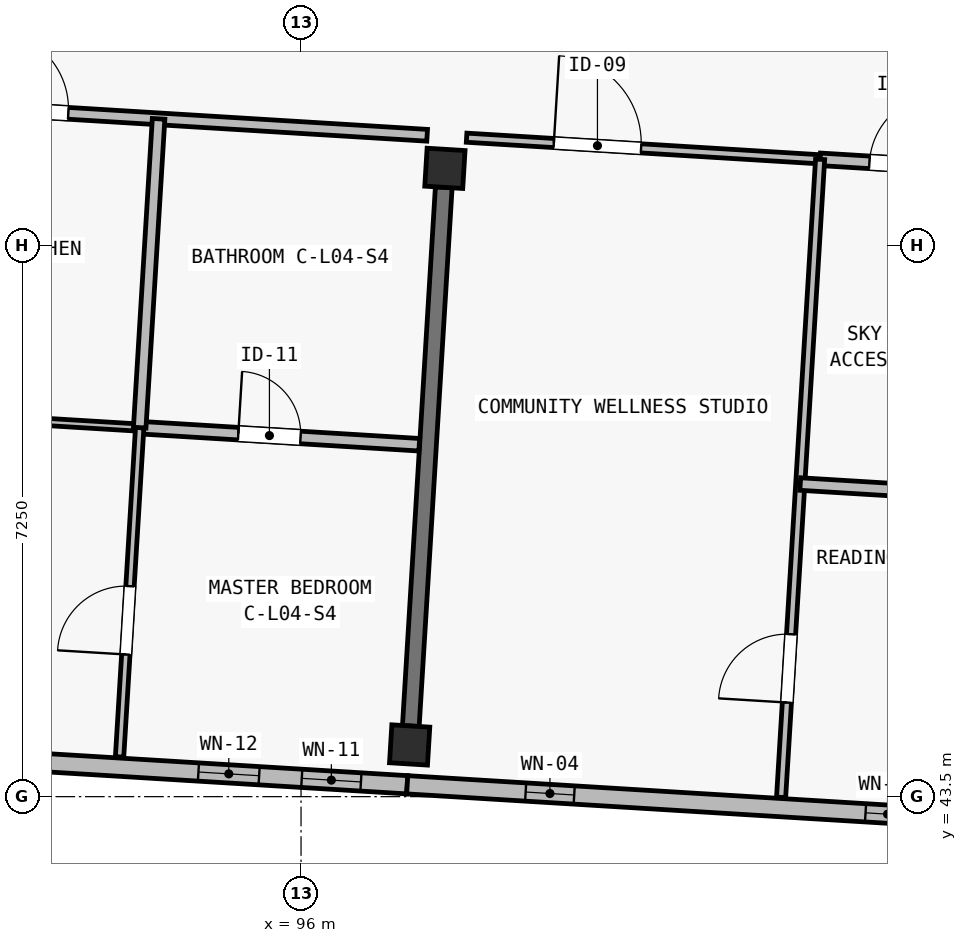
"""IFC4 building model, lengths in metres.
Left out: names, types, materials, properties, quantities, classifications, styles, units other than length and angle.
Written with IfcOpenShell. Run it as: python <this file> out.ifc"""

import sys

from ifc_helpers import new_model, si_unit, direction, frame, frame_2d, origin, origin_2d, place, context, subcontext, project, spatial, rectangle, extrude, element, fill, save


model = new_model("IFC4")
c1 = context("Model", 3, precision=1e-05, world=origin(), true_north=direction((0.0, 1.0)))
c2 = subcontext(c1, "Body", "Model", "MODEL_VIEW")
j1 = project(units=[si_unit("LENGTHUNIT", "METRE"), si_unit("PLANEANGLEUNIT", "RADIAN")], contexts=[c1])
p1 = place(None, origin())
s1 = spatial("IfcSite", under=j1, at=p1, CompositionType="ELEMENT")
p2 = place(p1, origin())
s2 = spatial("IfcBuilding", under=s1, at=p2, CompositionType="ELEMENT")
p3 = place(p2, frame((0.0, 0.0, 14.9)))
s3 = spatial("IfcBuildingStorey", under=s2, at=p3, CompositionType="ELEMENT", Elevation=14.9)
for number, where, z_axis, x_axis in (
    (1, (97.429, 44.18, 0.0), (0.0, 0.0, 1.0), (0.998, -0.061, 0.0)),
    (2, (97.893, 51.766, 0.0), (0.0, 0.0, 1.0), (0.998, -0.061, 0.0)),
):
    element("IfcColumn", number, at=place(p3, frame(where, z_axis=z_axis, x_axis=x_axis)), inside=s3, PredefinedType="COLUMN", context=c2, shape_type="SweptSolid", body=[
        extrude(rectangle(XDim=0.5, YDim=0.5, at=origin_2d()), origin(), (0.0, 0.0, 1.0), 3.25),
    ])
p4 = place(p3, frame((97.444, 44.43, 0.0), z_axis=(0.0, 0.0, 1.0), x_axis=(0.061070212127, 0.998133472633, 0.0)))
e3 = element("IfcWall", 3, at=p4, inside=s3, PredefinedType="SHEAR", context=c2, shape_type="SweptSolid", body=[
    extrude(rectangle(XDim=7.1, YDim=0.22, at=frame_2d((3.55, 0.0))), origin(), (0.0, 0.0, 1.0), 2.5),
])
p5 = place(p3, frame((97.397, 43.656, 0.0), z_axis=(0.0, 0.0, 1.0), x_axis=(-0.998135549572, 0.061036257095, 0.0)))
e4 = element("IfcWall", 4, at=p5, inside=s3, PredefinedType="SOLIDWALL", context=c2, shape_type="SweptSolid", body=[
    extrude(rectangle(XDim=7.6, YDim=0.24, at=frame_2d((3.8, 0.0))), origin(), (0.0, 0.0, 1.0), 3.0),
])
p6 = place(p5, frame((0.61, 0.0, 0.52)))
e5 = element("IfcOpeningElement", 5, at=p6, cuts=e4, PredefinedType="OPENING", context=c2, shape_type="SweptSolid", body=[
    extrude(rectangle(XDim=0.78, YDim=2.2, at=frame_2d((0.39, 1.1))), frame((0.0, 0.135, 0.0), z_axis=(0.0, -1.0, 0.0), x_axis=(1.0, 0.0, 0.0)), (0.0, 0.0, 1.0), 0.27),
])
p7 = place(p5, frame((1.952, 0.0, 0.42)))
e6 = element("IfcOpeningElement", 6, at=p7, cuts=e4, PredefinedType="OPENING", context=c2, shape_type="SweptSolid", body=[
    extrude(rectangle(XDim=0.8, YDim=2.3, at=frame_2d((0.4, 1.15))), frame((0.0, 0.135, 0.0), z_axis=(0.0, -1.0, 0.0), x_axis=(1.0, 0.0, 0.0)), (0.0, 0.0, 1.0), 0.27),
])
p8 = place(p5, frame((5.385, 0.0, 0.52)))
e7 = element("IfcOpeningElement", 7, at=p8, cuts=e4, PredefinedType="OPENING", context=c2, shape_type="SweptSolid", body=[
    extrude(rectangle(XDim=0.84, YDim=2.28, at=frame_2d((0.42, 1.14))), frame((0.0, 0.135, 0.0), z_axis=(0.0, -1.0, 0.0), x_axis=(1.0, 0.0, 0.0)), (0.0, 0.0, 1.0), 0.27),
])
p9 = place(p3, frame((105.507, 43.16, 0.0), z_axis=(0.0, 0.0, 1.0), x_axis=(-0.998134248939, 0.061057522844, 0.0)))
e8 = element("IfcWall", 8, at=p9, inside=s3, PredefinedType="SOLIDWALL", context=c2, shape_type="SweptSolid", body=[
    extrude(rectangle(XDim=8.125, YDim=0.24, at=frame_2d((4.062, 0.0))), origin(), (0.0, 0.0, 1.0), 3.0),
])
p10 = place(p9, frame((1.503, 0.0, 0.42)))
e9 = element("IfcOpeningElement", 9, at=p10, cuts=e8, PredefinedType="OPENING", context=c2, shape_type="SweptSolid", body=[
    extrude(rectangle(XDim=0.58, YDim=2.16, at=frame_2d((0.29, 1.08))), frame((0.0, 0.135, 0.0), z_axis=(0.0, -1.0, 0.0), x_axis=(1.0, 0.0, 0.0)), (0.0, 0.0, 1.0), 0.27),
])
p11 = place(p9, frame((5.924, 0.0, 0.42)))
e10 = element("IfcOpeningElement", 10, at=p11, cuts=e8, PredefinedType="OPENING", context=c2, shape_type="SweptSolid", body=[
    extrude(rectangle(XDim=0.64, YDim=2.18, at=frame_2d((0.32, 1.09))), frame((0.0, 0.135, 0.0), z_axis=(0.0, -1.0, 0.0), x_axis=(1.0, 0.0, 0.0)), (0.0, 0.0, 1.0), 0.27),
])
p12 = place(p3, frame((90.593, 52.633, 0.0), z_axis=(0.0, 0.0, 1.0), x_axis=(0.998135538078, -0.061036445065, 0.0)))
e11 = element("IfcWall", 11, at=p12, inside=s3, PredefinedType="PARTITIONING", context=c2, shape_type="SweptSolid", body=[
    extrude(rectangle(XDim=7.08, YDim=0.155, at=frame_2d((3.54, 0.0))), origin(), (0.0, 0.0, 1.0), 2.97),
])
p13 = place(p12, frame((1.33, 0.0, 0.0)))
e12 = element("IfcOpeningElement", 12, at=p13, cuts=e11, PredefinedType="OPENING", context=c2, shape_type="SweptSolid", body=[
    extrude(rectangle(XDim=1.02, YDim=2.2, at=frame_2d((0.51, 1.1))), frame((0.0, 0.093, 0.0), z_axis=(0.0, -1.0, 0.0), x_axis=(1.0, 0.0, 0.0)), (0.0, 0.0, 1.0), 0.185),
])
p14 = place(p3, frame((90.199, 48.58, 0.0), z_axis=(0.0, 0.0, 1.0), x_axis=(0.998132682596, -0.061083123148, 0.0)))
e13 = element("IfcWall", 13, at=p14, inside=s3, PredefinedType="PARTITIONING", context=c2, shape_type="SweptSolid", body=[
    extrude(rectangle(XDim=3.685, YDim=0.095, at=frame_2d((1.843, 0.0))), origin(), (0.0, 0.0, 1.0), 2.97),
])
p15 = place(p14, frame((1.525, 0.0, 0.0)))
e14 = element("IfcOpeningElement", 14, at=p15, cuts=e13, PredefinedType="OPENING", context=c2, shape_type="SweptSolid", body=[
    extrude(rectangle(XDim=0.9, YDim=2.1, at=frame_2d((0.45, 1.05))), frame((0.0, 0.062, 0.0), z_axis=(0.0, -1.0, 0.0), x_axis=(1.0, 0.0, 0.0)), (0.0, 0.0, 1.0), 0.125),
])
p16 = place(p3, frame((93.877, 48.355, 0.0), z_axis=(0.0, 0.0, 1.0), x_axis=(0.998136472989, -0.061021154439, 0.0)))
e15 = element("IfcWall", 15, at=p16, inside=s3, PredefinedType="PLUMBINGWALL", context=c2, shape_type="SweptSolid", body=[
    extrude(rectangle(XDim=3.685, YDim=0.165, at=frame_2d((1.842, 0.0))), origin(), (0.0, 0.0, 1.0), 2.97),
])
p17 = place(p16, frame((1.3, 0.0, 0.0)))
e16 = element("IfcOpeningElement", 16, at=p17, cuts=e15, PredefinedType="OPENING", context=c2, shape_type="SweptSolid", body=[
    extrude(rectangle(XDim=0.82, YDim=2.08, at=frame_2d((0.41, 1.04))), frame((0.0, 0.097, 0.0), z_axis=(0.0, -1.0, 0.0), x_axis=(1.0, 0.0, 0.0)), (0.0, 0.0, 1.0), 0.195),
])
p18 = place(p3, frame((93.612, 44.023, 0.0), z_axis=(0.0, 0.0, 1.0), x_axis=(0.061092906669, 0.998132083822, 0.0)))
e17 = element("IfcWall", 17, at=p18, inside=s3, PredefinedType="PARTITIONING", context=c2, shape_type="SweptSolid", body=[
    extrude(rectangle(XDim=4.34, YDim=0.11, at=frame_2d((2.17, 0.0))), origin(), (0.0, 0.0, 1.0), 2.97),
])
p19 = place(p18, frame((1.35, 0.0, 0.0)))
e18 = element("IfcOpeningElement", 18, at=p19, cuts=e17, PredefinedType="OPENING", context=c2, shape_type="SweptSolid", body=[
    extrude(rectangle(XDim=0.9, YDim=2.1, at=frame_2d((0.45, 1.05))), frame((0.0, 0.07, 0.0), z_axis=(0.0, -1.0, 0.0), x_axis=(1.0, 0.0, 0.0)), (0.0, 0.0, 1.0), 0.14),
])
p20 = place(p3, frame((93.877, 48.355, 0.0), z_axis=(0.0, 0.0, 1.0), x_axis=(0.061003958056, 0.998137524143, 0.0)))
e19 = element("IfcWall", 19, at=p20, inside=s3, PredefinedType="PLUMBINGWALL", context=c2, shape_type="SweptSolid", body=[
    extrude(rectangle(XDim=4.07, YDim=0.165, at=frame_2d((2.035, 0.0))), origin(), (0.0, 0.0, 1.0), 2.97),
])
p21 = place(p3, frame((98.178, 52.169, 0.0), z_axis=(0.0, 0.0, 1.0), x_axis=(0.998132468034, -0.061086629106, 0.0)))
e20 = element("IfcWall", 20, at=p21, inside=s3, PredefinedType="PARTITIONING", context=c2, shape_type="SweptSolid", body=[
    extrude(rectangle(XDim=4.66, YDim=0.12, at=frame_2d((2.33, 0.0))), origin(), (0.0, 0.0, 1.0), 2.97),
])
p22 = place(p21, frame((1.15, 0.0, 0.0)))
e21 = element("IfcOpeningElement", 21, at=p22, cuts=e20, PredefinedType="OPENING", context=c2, shape_type="SweptSolid", body=[
    extrude(rectangle(XDim=1.15, YDim=2.15, at=frame_2d((0.575, 1.075))), frame((0.0, 0.075, 0.0), z_axis=(0.0, -1.0, 0.0), x_axis=(1.0, 0.0, 0.0)), (0.0, 0.0, 1.0), 0.15),
])
p23 = place(p3, frame((102.83, 51.885, 0.0), z_axis=(0.0, 0.0, 1.0), x_axis=(0.998134491017, -0.061053565351, 0.0)))
e22 = element("IfcWall", 22, at=p23, inside=s3, PredefinedType="PLUMBINGWALL", context=c2, shape_type="SweptSolid", body=[
    extrude(rectangle(XDim=3.075, YDim=0.165, at=frame_2d((1.538, 0.0))), origin(), (0.0, 0.0, 1.0), 2.97),
])
p24 = place(p23, frame((0.65, 0.0, 0.0)))
e23 = element("IfcOpeningElement", 23, at=p24, cuts=e22, PredefinedType="OPENING", context=c2, shape_type="SweptSolid", body=[
    extrude(rectangle(XDim=0.96, YDim=2.12, at=frame_2d((0.48, 1.06))), frame((0.0, 0.097, 0.0), z_axis=(0.0, -1.0, 0.0), x_axis=(1.0, 0.0, 0.0)), (0.0, 0.0, 1.0), 0.195),
])
p25 = place(p3, frame((102.316, 43.49, 0.0), z_axis=(0.0, 0.0, 1.0), x_axis=(0.061049859271, 0.998134717702, 0.0)))
e24 = element("IfcWall", 24, at=p25, inside=s3, PredefinedType="PARTITIONING", context=c2, shape_type="SweptSolid", body=[
    extrude(rectangle(XDim=8.41, YDim=0.12, at=frame_2d((4.205, 0.0))), origin(), (0.0, 0.0, 1.0), 2.97),
])
p26 = place(p25, frame((1.25, 0.0, 0.0)))
e25 = element("IfcOpeningElement", 25, at=p26, cuts=e24, PredefinedType="OPENING", context=c2, shape_type="SweptSolid", body=[
    extrude(rectangle(XDim=0.9, YDim=2.1, at=frame_2d((0.45, 1.05))), frame((0.0, 0.075, 0.0), z_axis=(0.0, -1.0, 0.0), x_axis=(1.0, 0.0, 0.0)), (0.0, 0.0, 1.0), 0.15),
])
p27 = place(p3, frame((102.568, 47.613, 0.0), z_axis=(0.0, 0.0, 1.0), x_axis=(0.99813419504, -0.061058403944, 0.0)))
e26 = element("IfcWall", 26, at=p27, inside=s3, PredefinedType="PLUMBINGWALL", context=c2, shape_type="SweptSolid", body=[
    extrude(rectangle(XDim=3.075, YDim=0.165, at=frame_2d((1.537, 0.0))), origin(), (0.0, 0.0, 1.0), 2.97),
])
p28 = place(p6, origin())
e27 = element("IfcWindow", 27, at=p28, inside=s3, PartitioningType="SINGLE_PANEL", PredefinedType="WINDOW", context=c2, shape_type="SweptSolid", body=[
    extrude(rectangle(XDim=0.78, YDim=2.2, at=frame_2d((0.39, 1.1))), frame((0.0, 0.03, 0.0), z_axis=(0.0, -1.0, 0.0), x_axis=(1.0, 0.0, 0.0)), (0.0, 0.0, 1.0), 0.06),
])
fill(e5, e27)
p29 = place(p7, origin())
e28 = element("IfcWindow", 28, at=p29, inside=s3, PartitioningType="SINGLE_PANEL", PredefinedType="WINDOW", context=c2, shape_type="SweptSolid", body=[
    extrude(rectangle(XDim=0.8, YDim=2.3, at=frame_2d((0.4, 1.15))), frame((0.0, 0.03, 0.0), z_axis=(0.0, -1.0, 0.0), x_axis=(1.0, 0.0, 0.0)), (0.0, 0.0, 1.0), 0.06),
])
fill(e6, e28)
p30 = place(p10, origin())
e29 = element("IfcWindow", 29, at=p30, inside=s3, PartitioningType="SINGLE_PANEL", PredefinedType="WINDOW", context=c2, shape_type="SweptSolid", body=[
    extrude(rectangle(XDim=0.58, YDim=2.16, at=frame_2d((0.29, 1.08))), frame((0.0, 0.03, 0.0), z_axis=(0.0, -1.0, 0.0), x_axis=(1.0, 0.0, 0.0)), (0.0, 0.0, 1.0), 0.06),
])
fill(e9, e29)
p31 = place(p11, origin())
e30 = element("IfcWindow", 30, at=p31, inside=s3, PartitioningType="SINGLE_PANEL", PredefinedType="WINDOW", context=c2, shape_type="SweptSolid", body=[
    extrude(rectangle(XDim=0.64, YDim=2.18, at=frame_2d((0.32, 1.09))), frame((0.0, 0.03, 0.0), z_axis=(0.0, -1.0, 0.0), x_axis=(1.0, 0.0, 0.0)), (0.0, 0.0, 1.0), 0.06),
])
fill(e10, e30)
p32 = place(p13, origin())
e31 = element("IfcDoor", 31, at=p32, inside=s3, OperationType="SINGLE_SWING_LEFT", PredefinedType="DOOR", context=c2, shape_type="SweptSolid", body=[
    extrude(rectangle(XDim=1.02, YDim=2.2, at=frame_2d((0.51, 1.1))), frame((0.0, 0.025, 0.0), z_axis=(0.0, -1.0, 0.0), x_axis=(1.0, 0.0, 0.0)), (0.0, 0.0, 1.0), 0.05),
])
fill(e12, e31)
p33 = place(p17, origin())
e32 = element("IfcDoor", 32, at=p33, inside=s3, OperationType="SINGLE_SWING_LEFT", PredefinedType="DOOR", context=c2, shape_type="SweptSolid", body=[
    extrude(rectangle(XDim=0.82, YDim=2.08, at=frame_2d((0.41, 1.04))), frame((0.0, 0.025, 0.0), z_axis=(0.0, -1.0, 0.0), x_axis=(1.0, 0.0, 0.0)), (0.0, 0.0, 1.0), 0.05),
])
fill(e16, e32)
p34 = place(p19, origin())
e33 = element("IfcDoor", 33, at=p34, inside=s3, OperationType="SINGLE_SWING_LEFT", PredefinedType="DOOR", context=c2, shape_type="SweptSolid", body=[
    extrude(rectangle(XDim=0.9, YDim=2.1, at=frame_2d((0.45, 1.05))), frame((0.0, 0.025, 0.0), z_axis=(0.0, -1.0, 0.0), x_axis=(1.0, 0.0, 0.0)), (0.0, 0.0, 1.0), 0.05),
])
fill(e18, e33)
p35 = place(p22, origin())
e34 = element("IfcDoor", 34, at=p35, inside=s3, OperationType="SINGLE_SWING_LEFT", PredefinedType="DOOR", context=c2, shape_type="SweptSolid", body=[
    extrude(rectangle(XDim=1.15, YDim=2.15, at=frame_2d((0.575, 1.075))), frame((0.0, 0.025, 0.0), z_axis=(0.0, -1.0, 0.0), x_axis=(1.0, 0.0, 0.0)), (0.0, 0.0, 1.0), 0.05),
])
fill(e21, e34)
p36 = place(p24, origin())
e35 = element("IfcDoor", 35, at=p36, inside=s3, OperationType="SINGLE_SWING_RIGHT", PredefinedType="DOOR", context=c2, shape_type="SweptSolid", body=[
    extrude(rectangle(XDim=0.96, YDim=2.12, at=frame_2d((0.48, 1.06))), frame((0.0, 0.025, 0.0), z_axis=(0.0, -1.0, 0.0), x_axis=(1.0, 0.0, 0.0)), (0.0, 0.0, 1.0), 0.05),
])
fill(e23, e35)
p37 = place(p26, origin())
e36 = element("IfcDoor", 36, at=p37, inside=s3, OperationType="SINGLE_SWING_LEFT", PredefinedType="DOOR", context=c2, shape_type="SweptSolid", body=[
    extrude(rectangle(XDim=0.9, YDim=2.1, at=frame_2d((0.45, 1.05))), frame((0.0, 0.025, 0.0), z_axis=(0.0, -1.0, 0.0), x_axis=(1.0, 0.0, 0.0)), (0.0, 0.0, 1.0), 0.05),
])
fill(e25, e36)
save(model, sys.argv[1])
